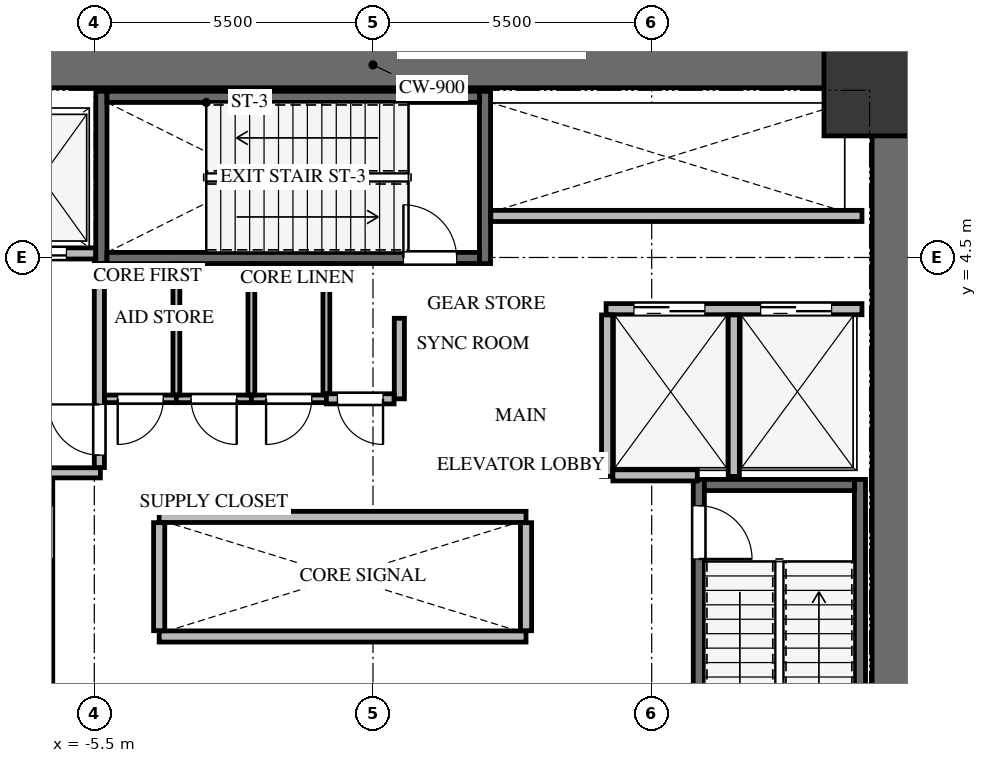
"""IFC4 building model, lengths in metres.
Left out: names, types, materials, properties, quantities, classifications, styles, units other than length and angle.
Written with IfcOpenShell. Run it as: python <this file> out.ifc"""

import sys

from ifc_helpers import new_model, si_unit, direction, frame, frame_2d, origin, origin_2d, place, context, subcontext, project, spatial, rectangle, extrude, source, transform, mapped, element, fill, save


model = new_model("IFC4")
c1 = context("Model", 3, precision=1e-05, world=origin(), true_north=direction((0.0, 1.0)))
c2 = subcontext(c1, "Body", "Model", "MODEL_VIEW")
j1 = project(units=[si_unit("LENGTHUNIT", "METRE"), si_unit("PLANEANGLEUNIT", "RADIAN")], contexts=[c1])
p1 = place(None, origin())
s1 = spatial("IfcSite", under=j1, at=p1, CompositionType="ELEMENT")
p2 = place(p1, origin())
s2 = spatial("IfcBuilding", under=s1, at=p2, CompositionType="ELEMENT")
p3 = place(p2, frame((0.0, 0.0, 5.2)))
s3 = spatial("IfcBuildingStorey", under=s2, at=p3, CompositionType="ELEMENT", Elevation=5.2)
p4 = place(p3, frame((10.3, -8.75, 0.0), z_axis=(0.0, 0.0, 1.0), x_axis=(0.0, 1.0, 0.0)))
e1 = element("IfcWall", 1, at=p4, inside=s3, PredefinedType="SHEAR", context=c2, shape_type="SweptSolid", body=[
    extrude(rectangle(XDim=17.5, YDim=0.9, at=frame_2d((8.75, 0.0))), origin(), (0.0, 0.0, 1.0), 5.2),
])
p5 = place(p3, frame((-9.85, 8.3, 0.0), z_axis=(0.0, 0.0, 1.0), x_axis=(1.0, 0.0, 0.0)))
e2 = element("IfcWall", 2, at=p5, inside=s3, PredefinedType="SHEAR", context=c2, shape_type="SweptSolid", body=[
    extrude(rectangle(XDim=19.7, YDim=0.9, at=frame_2d((9.85, 0.0))), origin(), (0.0, 0.0, 1.0), 5.2),
])
p6 = place(p3, frame((-6.43, -7.77, -0.3), z_axis=(0.0, 0.0, 1.0), x_axis=(0.0, 1.0, 0.0)))
e3 = element("IfcWall", 3, at=p6, inside=s3, PredefinedType="SHEAR", context=c2, shape_type="SweptSolid", body=[
    extrude(rectangle(XDim=7.89, YDim=0.22, at=frame_2d((3.945, 0.0))), origin(), (0.0, 0.0, 1.0), 5.15),
])
p7 = place(p6, frame((6.32, 0.0, 0.0)))
e4 = element("IfcOpeningElement", 4, at=p7, cuts=e3, PredefinedType="OPENING", context=c2, shape_type="SweptSolid", body=[
    extrude(rectangle(XDim=1.05, YDim=2.15, at=frame_2d((0.525, 1.075))), frame((0.0, 0.12, 0.0), z_axis=(0.0, -1.0, 0.0), x_axis=(1.0, 0.0, 0.0)), (0.0, 0.0, 1.0), 0.24),
])
p8 = place(p3, frame((9.61, -7.77, -0.3), z_axis=(0.0, 0.0, 1.0), x_axis=(0.0, 1.0, 0.0)))
e5 = element("IfcWall", 5, at=p8, inside=s3, PredefinedType="SHEAR", context=c2, shape_type="SweptSolid", body=[
    extrude(rectangle(XDim=7.89, YDim=0.22, at=frame_2d((3.945, 0.0))), origin(), (0.0, 0.0, 1.0), 5.15),
])
p9 = place(p3, frame((6.43, 0.12, -0.3), z_axis=(0.0, 0.0, 1.0), x_axis=(0.0, -1.0, 0.0)))
e6 = element("IfcWall", 6, at=p9, inside=s3, PredefinedType="SHEAR", context=c2, shape_type="SweptSolid", body=[
    extrude(rectangle(XDim=7.89, YDim=0.22, at=frame_2d((3.945, 0.0))), origin(), (0.0, 0.0, 1.0), 5.15),
])
p10 = place(p9, frame((0.52, 0.0, 0.0)))
e7 = element("IfcOpeningElement", 7, at=p10, cuts=e6, PredefinedType="OPENING", context=c2, shape_type="SweptSolid", body=[
    extrude(rectangle(XDim=1.05, YDim=2.15, at=frame_2d((0.525, 1.075))), frame((0.0, 0.12, 0.0), z_axis=(0.0, -1.0, 0.0), x_axis=(1.0, 0.0, 0.0)), (0.0, 0.0, 1.0), 0.24),
])
p11 = place(p3, frame((9.5, 0.01, -0.3), z_axis=(0.0, 0.0, 1.0), x_axis=(-1.0, 0.0, 0.0)))
e8 = element("IfcWall", 8, at=p11, inside=s3, PredefinedType="SHEAR", context=c2, shape_type="SweptSolid", body=[
    extrude(rectangle(XDim=2.96, YDim=0.22, at=frame_2d((1.48, 0.0))), origin(), (0.0, 0.0, 1.0), 5.15),
])
for number, where, z_axis, x_axis in (
    (9, (2.21, 4.38, -0.3), (0.0, 0.0, 1.0), (0.0, 1.0, 0.0)),
    (10, (-5.36, 7.78, -0.3), (0.0, 0.0, 1.0), (0.0, -1.0, 0.0)),
):
    element("IfcWall", number, at=place(p3, frame(where, z_axis=z_axis, x_axis=x_axis)), inside=s3, PredefinedType="SHEAR", context=c2, shape_type="SweptSolid", body=[
        extrude(rectangle(XDim=3.4, YDim=0.22, at=frame_2d((1.7, 0.0))), origin(), (0.0, 0.0, 1.0), 5.15),
    ])
p12 = place(p3, frame((-5.25, 4.49, -0.3), z_axis=(0.0, 0.0, 1.0), x_axis=(1.0, 0.0, 0.0)))
e11 = element("IfcWall", 11, at=p12, inside=s3, PredefinedType="SHEAR", context=c2, shape_type="SweptSolid", body=[
    extrude(rectangle(XDim=7.35, YDim=0.22, at=frame_2d((3.675, 0.0))), origin(), (0.0, 0.0, 1.0), 5.15),
])
p13 = place(p12, frame((5.85, 0.0, 0.0)))
e12 = element("IfcOpeningElement", 12, at=p13, cuts=e11, PredefinedType="OPENING", context=c2, shape_type="SweptSolid", body=[
    extrude(rectangle(XDim=1.05, YDim=2.15, at=frame_2d((0.525, 1.075))), frame((0.0, 0.12, 0.0), z_axis=(0.0, -1.0, 0.0), x_axis=(1.0, 0.0, 0.0)), (0.0, 0.0, 1.0), 0.24),
])
p14 = place(p3, frame((2.1, 7.67, -0.3), z_axis=(0.0, 0.0, 1.0), x_axis=(-1.0, 0.0, 0.0)))
e13 = element("IfcWall", 13, at=p14, inside=s3, PredefinedType="SHEAR", context=c2, shape_type="SweptSolid", body=[
    extrude(rectangle(XDim=7.35, YDim=0.22, at=frame_2d((3.675, 0.0))), origin(), (0.0, 0.0, 1.0), 5.15),
])
m1 = source(origin(), c2, "Body", "SweptSolid", [
    extrude(rectangle(XDim=1.8, YDim=1.8, at=origin_2d()), origin(), (0.0, 0.0, 1.0), 5.15),
])
p15 = place(p3, frame((9.8, 7.8, -0.3), z_axis=(0.0, 0.0, 1.0), x_axis=(1.0, 0.0, 0.0)))
e14 = element("IfcColumn", 14, at=p15, inside=s3, PredefinedType="COLUMN", context=c2, shape_type="MappedRepresentation", body=[
    mapped(m1, transform((0.0, 0.0, 0.0), x_axis=(1.0, 0.0, 0.0), y_axis=(0.0, 1.0, 0.0), z_axis=(0.0, 0.0, 1.0), scale=1.0)),
])
p16 = place(p3, frame((-9.65, 4.58, 0.0), z_axis=(0.0, 0.0, 1.0), x_axis=(1.0, 0.0, 0.0)))
e15 = element("IfcWall", 15, at=p16, inside=s3, PredefinedType="SOLIDWALL", context=c2, shape_type="SweptSolid", body=[
    extrude(rectangle(XDim=4.175, YDim=0.22, at=frame_2d((2.087, 0.0))), origin(), (0.0, 0.0, 1.0), 4.835),
])
p17 = place(p16, frame((0.4, 0.0, 0.0)))
e16 = element("IfcOpeningElement", 16, at=p17, cuts=e15, PredefinedType="OPENING", context=c2, shape_type="SweptSolid", body=[
    extrude(rectangle(XDim=1.2, YDim=2.15, at=frame_2d((0.6, 1.075))), frame((0.0, 0.12, 0.0), z_axis=(0.0, -1.0, 0.0), x_axis=(1.0, 0.0, 0.0)), (0.0, 0.0, 1.0), 0.24),
])
p18 = place(p16, frame((2.4, 0.0, 0.0)))
e17 = element("IfcOpeningElement", 17, at=p18, cuts=e15, PredefinedType="OPENING", context=c2, shape_type="SweptSolid", body=[
    extrude(rectangle(XDim=1.2, YDim=2.15, at=frame_2d((0.6, 1.075))), frame((0.0, 0.12, 0.0), z_axis=(0.0, -1.0, 0.0), x_axis=(1.0, 0.0, 0.0)), (0.0, 0.0, 1.0), 0.24),
])
p19 = place(p3, frame((-9.65, 0.25, 0.0), z_axis=(0.0, 0.0, 1.0), x_axis=(1.0, 0.0, 0.0)))
e18 = element("IfcWall", 18, at=p19, inside=s3, PredefinedType="SOLIDWALL", context=c2, shape_type="SweptSolid", body=[
    extrude(rectangle(XDim=4.27, YDim=0.2, at=frame_2d((2.135, 0.0))), origin(), (0.0, 0.0, 1.0), 4.835),
])
p20 = place(p3, frame((-5.4, 0.354, 0.0), z_axis=(0.0, 0.0, 1.0), x_axis=(0.0, 1.0, 0.0)))
e19 = element("IfcWall", 19, at=p20, inside=s3, PredefinedType="SOLIDWALL", context=c2, shape_type="SweptSolid", body=[
    extrude(rectangle(XDim=4.026, YDim=0.2, at=frame_2d((2.013, 0.0))), origin(), (0.0, 0.0, 1.0), 4.835),
])
p21 = place(p20, frame((0.246, 0.0, 0.0)))
e20 = element("IfcOpeningElement", 20, at=p21, cuts=e19, PredefinedType="OPENING", context=c2, shape_type="SweptSolid", body=[
    extrude(rectangle(XDim=1.0, YDim=2.15, at=frame_2d((0.5, 1.075))), frame((0.0, 0.11, 0.0), z_axis=(0.0, -1.0, 0.0), x_axis=(1.0, 0.0, 0.0)), (0.0, 0.0, 1.0), 0.22),
])
p22 = place(p3, frame((4.6, 3.48, 0.0), z_axis=(0.0, 0.0, 1.0), x_axis=(1.0, 0.0, 0.0)))
e21 = element("IfcWall", 21, at=p22, inside=s3, PredefinedType="SOLIDWALL", context=c2, shape_type="SweptSolid", body=[
    extrude(rectangle(XDim=5.05, YDim=0.22, at=frame_2d((2.525, 0.0))), origin(), (0.0, 0.0, 1.0), 4.835),
])
p23 = place(p22, frame((0.55, 0.0, 0.0)))
e22 = element("IfcOpeningElement", 22, at=p23, cuts=e21, PredefinedType="OPENING", context=c2, shape_type="SweptSolid", body=[
    extrude(rectangle(XDim=1.4, YDim=2.15, at=frame_2d((0.7, 1.075))), frame((0.0, 0.12, 0.0), z_axis=(0.0, -1.0, 0.0), x_axis=(1.0, 0.0, 0.0)), (0.0, 0.0, 1.0), 0.24),
])
p24 = place(p22, frame((3.05, 0.0, 0.0)))
e23 = element("IfcOpeningElement", 23, at=p24, cuts=e21, PredefinedType="OPENING", context=c2, shape_type="SweptSolid", body=[
    extrude(rectangle(XDim=1.4, YDim=2.15, at=frame_2d((0.7, 1.075))), frame((0.0, 0.12, 0.0), z_axis=(0.0, -1.0, 0.0), x_axis=(1.0, 0.0, 0.0)), (0.0, 0.0, 1.0), 0.24),
])
for number, where, z_axis, x_axis in (
    (24, (4.62, 0.18, 0.0), (0.0, 0.0, 1.0), (0.0, 1.0, 0.0)),
    (25, (7.12, 0.18, 0.0), (0.0, 0.0, 1.0), (0.0, 1.0, 0.0)),
):
    element("IfcWall", number, at=place(p3, frame(where, z_axis=z_axis, x_axis=x_axis)), inside=s3, PredefinedType="SOLIDWALL", context=c2, shape_type="SweptSolid", body=[
        extrude(rectangle(XDim=3.186, YDim=0.22, at=frame_2d((1.593, 0.0))), origin(), (0.0, 0.0, 1.0), 4.835),
    ])
p25 = place(p3, frame((4.734, 0.2, 0.0), z_axis=(0.0, 0.0, 1.0), x_axis=(1.0, 0.0, 0.0)))
e26 = element("IfcWall", 26, at=p25, inside=s3, PredefinedType="SOLIDWALL", context=c2, shape_type="SweptSolid", body=[
    extrude(rectangle(XDim=1.666, YDim=0.22, at=frame_2d((0.833, 0.0))), origin(), (0.0, 0.0, 1.0), 4.835),
])
for number, where, z_axis, x_axis in (
    (27, (-4.22, -2.98, 0.0), (0.0, 0.0, 1.0), (1.0, 0.0, 0.0)),
    (28, (-4.22, -0.62, 0.0), (0.0, 0.0, 1.0), (1.0, 0.0, 0.0)),
):
    element("IfcWall", number, at=place(p3, frame(where, z_axis=z_axis, x_axis=x_axis)), inside=s3, PredefinedType="SOLIDWALL", context=c2, shape_type="SweptSolid", body=[
        extrude(rectangle(XDim=7.24, YDim=0.22, at=frame_2d((3.62, 0.0))), origin(), (0.0, 0.0, 1.0), 4.835),
    ])
for number, where, z_axis, x_axis in (
    (29, (-4.22, -2.866, 0.0), (0.0, 0.0, 1.0), (0.0, 1.0, 0.0)),
    (30, (3.02, -2.866, 0.0), (0.0, 0.0, 1.0), (0.0, 1.0, 0.0)),
):
    element("IfcWall", number, at=place(p3, frame(where, z_axis=z_axis, x_axis=x_axis)), inside=s3, PredefinedType="SOLIDWALL", context=c2, shape_type="SweptSolid", body=[
        extrude(rectangle(XDim=2.132, YDim=0.22, at=frame_2d((1.066, 0.0))), origin(), (0.0, 0.0, 1.0), 4.835),
    ])
p26 = place(p3, frame((2.325, 5.32, 0.0), z_axis=(0.0, 0.0, 1.0), x_axis=(1.0, 0.0, 0.0)))
e31 = element("IfcWall", 31, at=p26, inside=s3, PredefinedType="SOLIDWALL", context=c2, shape_type="SweptSolid", body=[
    extrude(rectangle(XDim=7.325, YDim=0.22, at=frame_2d((3.663, 0.0))), origin(), (0.0, 0.0, 1.0), 4.835),
])
p27 = place(p3, frame((-3.88, 1.71, 0.0), z_axis=(0.0, 0.0, 1.0), x_axis=(-1.0, 0.0, 0.0)))
e32 = element("IfcWall", 32, at=p27, inside=s3, PredefinedType="PARTITIONING", context=c2, shape_type="SweptSolid", body=[
    extrude(rectangle(XDim=1.416, YDim=0.15, at=frame_2d((0.708, 0.0))), origin(), (0.0, 0.0, 1.0), 4.835),
])
p28 = place(p27, frame((0.258, 0.0, 0.0)))
e33 = element("IfcOpeningElement", 33, at=p28, cuts=e32, PredefinedType="OPENING", context=c2, shape_type="SweptSolid", body=[
    extrude(rectangle(XDim=0.9, YDim=2.05, at=frame_2d((0.45, 1.025))), frame((0.0, 0.085, 0.0), z_axis=(0.0, -1.0, 0.0), x_axis=(1.0, 0.0, 0.0)), (0.0, 0.0, 1.0), 0.17),
])
p29 = place(p3, frame((-2.4, 1.71, 0.0), z_axis=(0.0, 0.0, 1.0), x_axis=(-1.0, 0.0, 0.0)))
e34 = element("IfcWall", 34, at=p29, inside=s3, PredefinedType="PARTITIONING", context=c2, shape_type="SweptSolid", body=[
    extrude(rectangle(XDim=1.48, YDim=0.15, at=frame_2d((0.74, 0.0))), origin(), (0.0, 0.0, 1.0), 4.835),
])
p30 = place(p29, frame((0.29, 0.0, 0.0)))
e35 = element("IfcOpeningElement", 35, at=p30, cuts=e34, PredefinedType="OPENING", context=c2, shape_type="SweptSolid", body=[
    extrude(rectangle(XDim=0.9, YDim=2.05, at=frame_2d((0.45, 1.025))), frame((0.0, 0.085, 0.0), z_axis=(0.0, -1.0, 0.0), x_axis=(1.0, 0.0, 0.0)), (0.0, 0.0, 1.0), 0.17),
])
p31 = place(p3, frame((-0.92, 1.71, 0.0), z_axis=(0.0, 0.0, 1.0), x_axis=(-1.0, 0.0, 0.0)))
e36 = element("IfcWall", 36, at=p31, inside=s3, PredefinedType="PARTITIONING", context=c2, shape_type="SweptSolid", body=[
    extrude(rectangle(XDim=1.48, YDim=0.15, at=frame_2d((0.74, 0.0))), origin(), (0.0, 0.0, 1.0), 4.835),
])
p32 = place(p31, frame((0.29, 0.0, 0.0)))
e37 = element("IfcOpeningElement", 37, at=p32, cuts=e36, PredefinedType="OPENING", context=c2, shape_type="SweptSolid", body=[
    extrude(rectangle(XDim=0.9, YDim=2.05, at=frame_2d((0.45, 1.025))), frame((0.0, 0.085, 0.0), z_axis=(0.0, -1.0, 0.0), x_axis=(1.0, 0.0, 0.0)), (0.0, 0.0, 1.0), 0.17),
])
p33 = place(p3, frame((0.52, 3.3, 0.0), z_axis=(0.0, 0.0, 1.0), x_axis=(0.0, -1.0, 0.0)))
e38 = element("IfcWall", 38, at=p33, inside=s3, PredefinedType="SOLIDWALL", context=c2, shape_type="SweptSolid", body=[
    extrude(rectangle(XDim=1.59, YDim=0.2, at=frame_2d((0.795, 0.0))), origin(), (0.0, 0.0, 1.0), 4.835),
])
p34 = place(p3, frame((0.416, 1.71, 0.0), z_axis=(0.0, 0.0, 1.0), x_axis=(-1.0, 0.0, 0.0)))
e39 = element("IfcWall", 39, at=p34, inside=s3, PredefinedType="SOLIDWALL", context=c2, shape_type="SweptSolid", body=[
    extrude(rectangle(XDim=1.336, YDim=0.2, at=frame_2d((0.668, 0.0))), origin(), (0.0, 0.0, 1.0), 4.835),
])
p35 = place(p34, frame((0.218, 0.0, 0.0)))
e40 = element("IfcOpeningElement", 40, at=p35, cuts=e39, PredefinedType="OPENING", context=c2, shape_type="SweptSolid", body=[
    extrude(rectangle(XDim=0.9, YDim=2.05, at=frame_2d((0.45, 1.025))), frame((0.0, 0.11, 0.0), z_axis=(0.0, -1.0, 0.0), x_axis=(1.0, 0.0, 0.0)), (0.0, 0.0, 1.0), 0.22),
])
for number, where, z_axis, x_axis in (
    (41, (-3.88, 4.375, 0.0), (0.0, 0.0, 1.0), (0.0, -1.0, 0.0)),
    (42, (-2.4, 4.375, 0.0), (0.0, 0.0, 1.0), (0.0, -1.0, 0.0)),
):
    element("IfcWall", number, at=place(p3, frame(where, z_axis=z_axis, x_axis=x_axis)), inside=s3, PredefinedType="PARTITIONING", context=c2, shape_type="SweptSolid", body=[
        extrude(rectangle(XDim=2.586, YDim=0.135, at=frame_2d((1.293, 0.0))), origin(), (0.0, 0.0, 1.0), 4.835),
    ])
p36 = place(p3, frame((-0.92, 4.375, 0.0), z_axis=(0.0, 0.0, 1.0), x_axis=(0.0, -1.0, 0.0)))
e43 = element("IfcWall", 43, at=p36, inside=s3, PredefinedType="PARTITIONING", context=c2, shape_type="SweptSolid", body=[
    extrude(rectangle(XDim=2.561, YDim=0.135, at=frame_2d((1.281, 0.0))), origin(), (0.0, 0.0, 1.0), 4.835),
])
m2 = source(origin(), c2, "Body", "SweptSolid", [
    extrude(rectangle(XDim=1.05, YDim=2.15, at=frame_2d((0.525, 1.075))), frame((0.0, 0.025, 0.0), z_axis=(0.0, -1.0, 0.0), x_axis=(1.0, 0.0, 0.0)), (0.0, 0.0, 1.0), 0.05),
])
p37 = place(p10, origin())
e44 = element("IfcDoor", 44, at=p37, inside=s3, OperationType="SINGLE_SWING_RIGHT", PredefinedType="DOOR", context=c2, shape_type="MappedRepresentation", body=[
    mapped(m2, transform((0.0, 0.0, 0.0), x_axis=(1.0, 0.0, 0.0), y_axis=(0.0, 1.0, 0.0), z_axis=(0.0, 0.0, 1.0), scale=1.0)),
])
fill(e7, e44)
m3 = source(origin(), c2, "Body", "SweptSolid", [
    extrude(rectangle(XDim=1.05, YDim=2.15, at=frame_2d((0.525, 1.075))), frame((0.0, 0.025, 0.0), z_axis=(0.0, -1.0, 0.0), x_axis=(1.0, 0.0, 0.0)), (0.0, 0.0, 1.0), 0.05),
])
p38 = place(p13, origin())
e45 = element("IfcDoor", 45, at=p38, inside=s3, OperationType="SINGLE_SWING_LEFT", PredefinedType="DOOR", context=c2, shape_type="MappedRepresentation", body=[
    mapped(m3, transform((0.0, 0.0, 0.0), x_axis=(1.0, 0.0, 0.0), y_axis=(0.0, 1.0, 0.0), z_axis=(0.0, 0.0, 1.0), scale=1.0)),
])
fill(e12, e45)
m4 = source(origin(), c2, "Body", "SweptSolid", [
    extrude(rectangle(XDim=1.2, YDim=2.15, at=frame_2d((0.6, 1.075))), frame((0.0, 0.025, 0.0), z_axis=(0.0, -1.0, 0.0), x_axis=(1.0, 0.0, 0.0)), (0.0, 0.0, 1.0), 0.05),
])
p39 = place(p18, origin())
e46 = element("IfcDoor", 46, at=p39, inside=s3, OperationType="DOUBLE_DOOR_SLIDING", PredefinedType="DOOR", context=c2, shape_type="MappedRepresentation", body=[
    mapped(m4, transform((0.0, 0.0, 0.0), x_axis=(1.0, 0.0, 0.0), y_axis=(0.0, 1.0, 0.0), z_axis=(0.0, 0.0, 1.0), scale=1.0)),
])
fill(e17, e46)
m5 = source(origin(), c2, "Body", "SweptSolid", [
    extrude(rectangle(XDim=1.0, YDim=2.15, at=frame_2d((0.5, 1.075))), frame((0.0, 0.025, 0.0), z_axis=(0.0, -1.0, 0.0), x_axis=(1.0, 0.0, 0.0)), (0.0, 0.0, 1.0), 0.05),
])
p40 = place(p21, origin())
e47 = element("IfcDoor", 47, at=p40, inside=s3, OperationType="SINGLE_SWING_RIGHT", PredefinedType="DOOR", context=c2, shape_type="MappedRepresentation", body=[
    mapped(m5, transform((0.0, 0.0, 0.0), x_axis=(1.0, 0.0, 0.0), y_axis=(0.0, 1.0, 0.0), z_axis=(0.0, 0.0, 1.0), scale=1.0)),
])
fill(e20, e47)
m6 = source(origin(), c2, "Body", "SweptSolid", [
    extrude(rectangle(XDim=1.4, YDim=2.15, at=frame_2d((0.7, 1.075))), frame((0.0, 0.025, 0.0), z_axis=(0.0, -1.0, 0.0), x_axis=(1.0, 0.0, 0.0)), (0.0, 0.0, 1.0), 0.05),
])
p41 = place(p23, origin())
e48 = element("IfcDoor", 48, at=p41, inside=s3, OperationType="DOUBLE_DOOR_SLIDING", PredefinedType="DOOR", context=c2, shape_type="MappedRepresentation", body=[
    mapped(m6, transform((0.0, 0.0, 0.0), x_axis=(1.0, 0.0, 0.0), y_axis=(0.0, 1.0, 0.0), z_axis=(0.0, 0.0, 1.0), scale=1.0)),
])
fill(e22, e48)
p42 = place(p24, origin())
e49 = element("IfcDoor", 49, at=p42, inside=s3, OperationType="DOUBLE_DOOR_SLIDING", PredefinedType="DOOR", context=c2, shape_type="MappedRepresentation", body=[
    mapped(m6, transform((0.0, 0.0, 0.0), x_axis=(1.0, 0.0, 0.0), y_axis=(0.0, 1.0, 0.0), z_axis=(0.0, 0.0, 1.0), scale=1.0)),
])
fill(e23, e49)
m7 = source(origin(), c2, "Body", "SweptSolid", [
    extrude(rectangle(XDim=0.9, YDim=2.05, at=frame_2d((0.45, 1.025))), frame((0.0, 0.025, 0.0), z_axis=(0.0, -1.0, 0.0), x_axis=(1.0, 0.0, 0.0)), (0.0, 0.0, 1.0), 0.05),
])
p43 = place(p28, origin())
e50 = element("IfcDoor", 50, at=p43, inside=s3, OperationType="SINGLE_SWING_RIGHT", PredefinedType="DOOR", context=c2, shape_type="MappedRepresentation", body=[
    mapped(m7, transform((0.0, 0.0, 0.0), x_axis=(1.0, 0.0, 0.0), y_axis=(0.0, 1.0, 0.0), z_axis=(0.0, 0.0, 1.0), scale=1.0)),
])
fill(e33, e50)
m8 = source(origin(), c2, "Body", "SweptSolid", [
    extrude(rectangle(XDim=0.9, YDim=2.05, at=frame_2d((0.45, 1.025))), frame((0.0, 0.025, 0.0), z_axis=(0.0, -1.0, 0.0), x_axis=(1.0, 0.0, 0.0)), (0.0, 0.0, 1.0), 0.05),
])
p44 = place(p30, origin())
e51 = element("IfcDoor", 51, at=p44, inside=s3, OperationType="SINGLE_SWING_LEFT", PredefinedType="DOOR", context=c2, shape_type="MappedRepresentation", body=[
    mapped(m8, transform((0.0, 0.0, 0.0), x_axis=(1.0, 0.0, 0.0), y_axis=(0.0, 1.0, 0.0), z_axis=(0.0, 0.0, 1.0), scale=1.0)),
])
fill(e35, e51)
p45 = place(p32, origin())
e52 = element("IfcDoor", 52, at=p45, inside=s3, OperationType="SINGLE_SWING_RIGHT", PredefinedType="DOOR", context=c2, shape_type="MappedRepresentation", body=[
    mapped(m7, transform((0.0, 0.0, 0.0), x_axis=(1.0, 0.0, 0.0), y_axis=(0.0, 1.0, 0.0), z_axis=(0.0, 0.0, 1.0), scale=1.0)),
])
fill(e37, e52)
p46 = place(p35, origin())
e53 = element("IfcDoor", 53, at=p46, inside=s3, OperationType="SINGLE_SWING_LEFT", PredefinedType="DOOR", context=c2, shape_type="MappedRepresentation", body=[
    mapped(m8, transform((0.0, 0.0, 0.0), x_axis=(1.0, 0.0, 0.0), y_axis=(0.0, 1.0, 0.0), z_axis=(0.0, 0.0, 1.0), scale=1.0)),
])
fill(e40, e53)
save(model, sys.argv[1])
